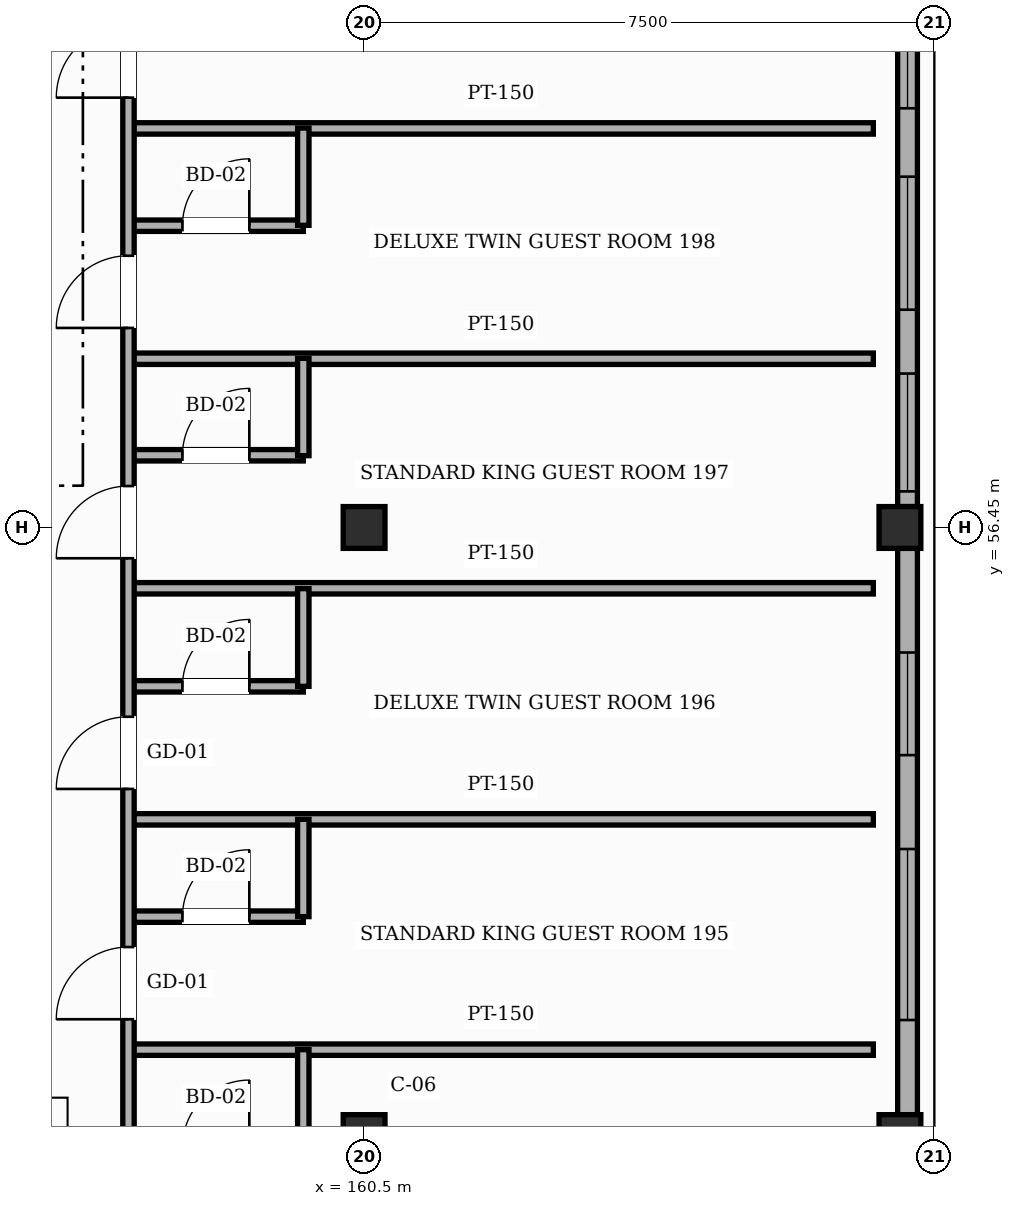
"""IFC4 building model, lengths in metres.
Left out: names, types, materials, properties, quantities, classifications, styles, units other than length and angle.
Written with IfcOpenShell. Run it as: python <this file> out.ifc"""

import sys

from ifc_helpers import new_model, si_unit, direction, frame, frame_2d, origin, origin_2d, place, context, subcontext, project, spatial, rectangle, hollow_rectangle, extrude, element, fill, save


model = new_model("IFC4")
c1 = context("Model", 3, precision=1e-05, world=origin(), true_north=direction((0.0, 1.0)))
c2 = subcontext(c1, "Body", "Model", "MODEL_VIEW")
j1 = project(units=[si_unit("LENGTHUNIT", "METRE"), si_unit("PLANEANGLEUNIT", "RADIAN")], contexts=[c1])
p1 = place(None, origin())
s1 = spatial("IfcSite", under=j1, at=p1, CompositionType="ELEMENT")
p2 = place(p1, origin())
s2 = spatial("IfcBuilding", under=s1, at=p2, CompositionType="ELEMENT")
p3 = place(p2, frame((0.0, 0.0, 31.8)))
s3 = spatial("IfcBuildingStorey", under=s2, at=p3, CompositionType="ELEMENT", Elevation=31.8)
for number, where, z_axis, x_axis in (
    (1, (160.5, 48.45, 0.0), (0.0, 0.0, 1.0), (1.0, 0.0, 0.0)),
    (2, (160.5, 56.45, 0.0), (0.0, 0.0, 1.0), (1.0, 0.0, 0.0)),
    (3, (167.55, 48.45, 0.0), (0.0, 0.0, 1.0), (1.0, 0.0, 0.0)),
    (4, (167.55, 56.45, 0.0), (0.0, 0.0, 1.0), (1.0, 0.0, 0.0)),
):
    element("IfcColumn", number, at=place(p3, frame(where, z_axis=z_axis, x_axis=x_axis)), inside=s3, PredefinedType="COLUMN", context=c2, shape_type="SweptSolid", body=[
        extrude(hollow_rectangle(XDim=0.55, YDim=0.55, WallThickness=0.022, InnerFilletRadius=0.022, OuterFilletRadius=0.044, at=origin_2d()), origin(), (0.0, 0.0, 1.0), 3.6),
    ])
p4 = place(p3, frame((167.65, 56.175, 0.0), z_axis=(0.0, 0.0, 1.0), x_axis=(0.0, -1.0, 0.0)))
e5 = element("IfcWall", 5, at=p4, inside=s3, PredefinedType="SOLIDWALL", context=c2, shape_type="SweptSolid", body=[
    extrude(rectangle(XDim=7.45, YDim=0.26, at=frame_2d((3.725, 0.0))), origin(), (0.0, 0.0, 1.0), 2.755),
])
p5 = place(p4, frame((3.955, 0.0, 0.85)))
e6 = element("IfcOpeningElement", 6, at=p5, cuts=e5, PredefinedType="OPENING", context=c2, shape_type="SweptSolid", body=[
    extrude(rectangle(XDim=2.25, YDim=1.65, at=frame_2d((1.125, 0.825))), frame((0.0, 0.14, 0.0), z_axis=(0.0, -1.0, 0.0), x_axis=(1.0, 0.0, 0.0)), (0.0, 0.0, 1.0), 0.28),
])
p6 = place(p4, frame((1.37, 0.0, 0.85)))
e7 = element("IfcOpeningElement", 7, at=p6, cuts=e5, PredefinedType="OPENING", context=c2, shape_type="SweptSolid", body=[
    extrude(rectangle(XDim=1.35, YDim=1.35, at=frame_2d((0.675, 0.675))), frame((0.0, 0.14, 0.0), z_axis=(0.0, -1.0, 0.0), x_axis=(1.0, 0.0, 0.0)), (0.0, 0.0, 1.0), 0.28),
])
p7 = place(p3, frame((167.65, 64.175, 0.0), z_axis=(0.0, 0.0, 1.0), x_axis=(0.0, -1.0, 0.0)))
e8 = element("IfcWall", 8, at=p7, inside=s3, PredefinedType="SOLIDWALL", context=c2, shape_type="SweptSolid", body=[
    extrude(rectangle(XDim=7.45, YDim=0.26, at=frame_2d((3.725, 0.0))), origin(), (0.0, 0.0, 1.0), 2.755),
])
p8 = place(p7, frame((5.7, 0.0, 0.85)))
e9 = element("IfcOpeningElement", 9, at=p8, cuts=e8, PredefinedType="OPENING", context=c2, shape_type="SweptSolid", body=[
    extrude(rectangle(XDim=1.55, YDim=1.35, at=frame_2d((0.775, 0.675))), frame((0.0, 0.14, 0.0), z_axis=(0.0, -1.0, 0.0), x_axis=(1.0, 0.0, 0.0)), (0.0, 0.0, 1.0), 0.28),
])
p9 = place(p7, frame((3.11, 0.0, 0.85)))
e10 = element("IfcOpeningElement", 10, at=p9, cuts=e8, PredefinedType="OPENING", context=c2, shape_type="SweptSolid", body=[
    extrude(rectangle(XDim=1.75, YDim=1.35, at=frame_2d((0.875, 0.675))), frame((0.0, 0.14, 0.0), z_axis=(0.0, -1.0, 0.0), x_axis=(1.0, 0.0, 0.0)), (0.0, 0.0, 1.0), 0.28),
])
p10 = place(p7, frame((0.26, 0.0, 0.85)))
e11 = element("IfcOpeningElement", 11, at=p10, cuts=e8, PredefinedType="OPENING", context=c2, shape_type="SweptSolid", body=[
    extrude(rectangle(XDim=1.95, YDim=1.35, at=frame_2d((0.975, 0.675))), frame((0.0, 0.14, 0.0), z_axis=(0.0, -1.0, 0.0), x_axis=(1.0, 0.0, 0.0)), (0.0, 0.0, 1.0), 0.28),
])
p11 = place(p3, frame((157.4, 49.58, 0.0), z_axis=(0.0, 0.0, 1.0), x_axis=(1.0, 0.0, 0.0)))
e12 = element("IfcWall", 12, at=p11, inside=s3, PredefinedType="PARTITIONING", context=c2, shape_type="SweptSolid", body=[
    extrude(rectangle(XDim=9.8, YDim=0.15, at=frame_2d((4.9, 0.0))), origin(), (0.0, 0.0, 1.0), 3.365),
])
p12 = place(p3, frame((157.4, 51.33, 0.0), z_axis=(0.0, 0.0, 1.0), x_axis=(1.0, 0.0, 0.0)))
e13 = element("IfcWall", 13, at=p12, inside=s3, PredefinedType="PARTITIONING", context=c2, shape_type="SweptSolid", body=[
    extrude(rectangle(XDim=2.3, YDim=0.15, at=frame_2d((1.15, 0.0))), origin(), (0.0, 0.0, 1.0), 3.365),
])
p13 = place(p12, frame((0.71, 0.0, 0.0)))
e14 = element("IfcOpeningElement", 14, at=p13, cuts=e13, PredefinedType="OPENING", context=c2, shape_type="SweptSolid", body=[
    extrude(rectangle(XDim=0.88, YDim=2.12, at=frame_2d((0.44, 1.06))), frame((0.0, 0.085, 0.0), z_axis=(0.0, -1.0, 0.0), x_axis=(1.0, 0.0, 0.0)), (0.0, 0.0, 1.0), 0.17),
])
p14 = place(p3, frame((157.4, 52.61, 0.0), z_axis=(0.0, 0.0, 1.0), x_axis=(1.0, 0.0, 0.0)))
e15 = element("IfcWall", 15, at=p14, inside=s3, PredefinedType="PARTITIONING", context=c2, shape_type="SweptSolid", body=[
    extrude(rectangle(XDim=9.8, YDim=0.15, at=frame_2d((4.9, 0.0))), origin(), (0.0, 0.0, 1.0), 3.055),
])
p15 = place(p3, frame((157.4, 54.36, 0.0), z_axis=(0.0, 0.0, 1.0), x_axis=(1.0, 0.0, 0.0)))
e16 = element("IfcWall", 16, at=p15, inside=s3, PredefinedType="PARTITIONING", context=c2, shape_type="SweptSolid", body=[
    extrude(rectangle(XDim=2.3, YDim=0.15, at=frame_2d((1.15, 0.0))), origin(), (0.0, 0.0, 1.0), 3.365),
])
p16 = place(p15, frame((0.71, 0.0, 0.0)))
e17 = element("IfcOpeningElement", 17, at=p16, cuts=e16, PredefinedType="OPENING", context=c2, shape_type="SweptSolid", body=[
    extrude(rectangle(XDim=0.88, YDim=2.12, at=frame_2d((0.44, 1.06))), frame((0.0, 0.085, 0.0), z_axis=(0.0, -1.0, 0.0), x_axis=(1.0, 0.0, 0.0)), (0.0, 0.0, 1.0), 0.17),
])
p17 = place(p3, frame((157.4, 55.65, 0.0), z_axis=(0.0, 0.0, 1.0), x_axis=(1.0, 0.0, 0.0)))
e18 = element("IfcWall", 18, at=p17, inside=s3, PredefinedType="PARTITIONING", context=c2, shape_type="SweptSolid", body=[
    extrude(rectangle(XDim=9.8, YDim=0.15, at=frame_2d((4.9, 0.0))), origin(), (0.0, 0.0, 1.0), 3.365),
])
p18 = place(p3, frame((157.4, 57.4, 0.0), z_axis=(0.0, 0.0, 1.0), x_axis=(1.0, 0.0, 0.0)))
e19 = element("IfcWall", 19, at=p18, inside=s3, PredefinedType="PARTITIONING", context=c2, shape_type="SweptSolid", body=[
    extrude(rectangle(XDim=2.3, YDim=0.15, at=frame_2d((1.15, 0.0))), origin(), (0.0, 0.0, 1.0), 3.365),
])
p19 = place(p18, frame((0.71, 0.0, 0.0)))
e20 = element("IfcOpeningElement", 20, at=p19, cuts=e19, PredefinedType="OPENING", context=c2, shape_type="SweptSolid", body=[
    extrude(rectangle(XDim=0.88, YDim=2.12, at=frame_2d((0.44, 1.06))), frame((0.0, 0.085, 0.0), z_axis=(0.0, -1.0, 0.0), x_axis=(1.0, 0.0, 0.0)), (0.0, 0.0, 1.0), 0.17),
])
p20 = place(p3, frame((157.4, 58.67, 0.0), z_axis=(0.0, 0.0, 1.0), x_axis=(1.0, 0.0, 0.0)))
e21 = element("IfcWall", 21, at=p20, inside=s3, PredefinedType="PARTITIONING", context=c2, shape_type="SweptSolid", body=[
    extrude(rectangle(XDim=9.8, YDim=0.15, at=frame_2d((4.9, 0.0))), origin(), (0.0, 0.0, 1.0), 3.365),
])
p21 = place(p3, frame((157.4, 60.42, 0.0), z_axis=(0.0, 0.0, 1.0), x_axis=(1.0, 0.0, 0.0)))
e22 = element("IfcWall", 22, at=p21, inside=s3, PredefinedType="PARTITIONING", context=c2, shape_type="SweptSolid", body=[
    extrude(rectangle(XDim=2.3, YDim=0.15, at=frame_2d((1.15, 0.0))), origin(), (0.0, 0.0, 1.0), 3.365),
])
p22 = place(p21, frame((0.71, 0.0, 0.0)))
e23 = element("IfcOpeningElement", 23, at=p22, cuts=e22, PredefinedType="OPENING", context=c2, shape_type="SweptSolid", body=[
    extrude(rectangle(XDim=0.88, YDim=2.12, at=frame_2d((0.44, 1.06))), frame((0.0, 0.085, 0.0), z_axis=(0.0, -1.0, 0.0), x_axis=(1.0, 0.0, 0.0)), (0.0, 0.0, 1.0), 0.17),
])
p23 = place(p3, frame((157.4, 61.7, 0.0), z_axis=(0.0, 0.0, 1.0), x_axis=(1.0, 0.0, 0.0)))
e24 = element("IfcWall", 24, at=p23, inside=s3, PredefinedType="PARTITIONING", context=c2, shape_type="SweptSolid", body=[
    extrude(rectangle(XDim=9.8, YDim=0.15, at=frame_2d((4.9, 0.0))), origin(), (0.0, 0.0, 1.0), 3.365),
])
p24 = place(p3, frame((157.4, 22.3, 0.0), z_axis=(0.0, 0.0, 1.0), x_axis=(0.0, 1.0, 0.0)))
e25 = element("IfcWall", 25, at=p24, inside=s3, PredefinedType="PARTITIONING", context=c2, shape_type="SweptSolid", body=[
    extrude(rectangle(XDim=48.5, YDim=0.15, at=frame_2d((24.25, 0.0))), origin(), (0.0, 0.0, 1.0), 3.365),
])
p25 = place(p24, frame((0.4, 0.0, 0.0)))
e26 = element("IfcOpeningElement", 26, at=p25, cuts=e25, PredefinedType="OPENING", context=c2, shape_type="SweptSolid", body=[
    extrude(rectangle(XDim=0.95, YDim=2.15, at=frame_2d((0.475, 1.075))), frame((0.0, 0.085, 0.0), z_axis=(0.0, -1.0, 0.0), x_axis=(1.0, 0.0, 0.0)), (0.0, 0.0, 1.0), 0.17),
])
p26 = place(p24, frame((3.43, 0.0, 0.0)))
e27 = element("IfcOpeningElement", 27, at=p26, cuts=e25, PredefinedType="OPENING", context=c2, shape_type="SweptSolid", body=[
    extrude(rectangle(XDim=0.95, YDim=2.15, at=frame_2d((0.475, 1.075))), frame((0.0, 0.085, 0.0), z_axis=(0.0, -1.0, 0.0), x_axis=(1.0, 0.0, 0.0)), (0.0, 0.0, 1.0), 0.17),
])
p27 = place(p24, frame((6.46, 0.0, 0.0)))
e28 = element("IfcOpeningElement", 28, at=p27, cuts=e25, PredefinedType="OPENING", context=c2, shape_type="SweptSolid", body=[
    extrude(rectangle(XDim=0.95, YDim=2.15, at=frame_2d((0.475, 1.075))), frame((0.0, 0.085, 0.0), z_axis=(0.0, -1.0, 0.0), x_axis=(1.0, 0.0, 0.0)), (0.0, 0.0, 1.0), 0.17),
])
p28 = place(p24, frame((9.495, 0.0, 0.0)))
e29 = element("IfcOpeningElement", 29, at=p28, cuts=e25, PredefinedType="OPENING", context=c2, shape_type="SweptSolid", body=[
    extrude(rectangle(XDim=0.95, YDim=2.15, at=frame_2d((0.475, 1.075))), frame((0.0, 0.085, 0.0), z_axis=(0.0, -1.0, 0.0), x_axis=(1.0, 0.0, 0.0)), (0.0, 0.0, 1.0), 0.17),
])
p29 = place(p24, frame((12.525, 0.0, 0.0)))
e30 = element("IfcOpeningElement", 30, at=p29, cuts=e25, PredefinedType="OPENING", context=c2, shape_type="SweptSolid", body=[
    extrude(rectangle(XDim=0.95, YDim=2.15, at=frame_2d((0.475, 1.075))), frame((0.0, 0.085, 0.0), z_axis=(0.0, -1.0, 0.0), x_axis=(1.0, 0.0, 0.0)), (0.0, 0.0, 1.0), 0.17),
])
p30 = place(p24, frame((15.555, 0.0, 0.0)))
e31 = element("IfcOpeningElement", 31, at=p30, cuts=e25, PredefinedType="OPENING", context=c2, shape_type="SweptSolid", body=[
    extrude(rectangle(XDim=0.95, YDim=2.15, at=frame_2d((0.475, 1.075))), frame((0.0, 0.085, 0.0), z_axis=(0.0, -1.0, 0.0), x_axis=(1.0, 0.0, 0.0)), (0.0, 0.0, 1.0), 0.17),
])
p31 = place(p24, frame((18.585, 0.0, 0.0)))
e32 = element("IfcOpeningElement", 32, at=p31, cuts=e25, PredefinedType="OPENING", context=c2, shape_type="SweptSolid", body=[
    extrude(rectangle(XDim=0.95, YDim=2.15, at=frame_2d((0.475, 1.075))), frame((0.0, 0.085, 0.0), z_axis=(0.0, -1.0, 0.0), x_axis=(1.0, 0.0, 0.0)), (0.0, 0.0, 1.0), 0.17),
])
p32 = place(p24, frame((21.62, 0.0, 0.0)))
e33 = element("IfcOpeningElement", 33, at=p32, cuts=e25, PredefinedType="OPENING", context=c2, shape_type="SweptSolid", body=[
    extrude(rectangle(XDim=0.95, YDim=2.15, at=frame_2d((0.475, 1.075))), frame((0.0, 0.085, 0.0), z_axis=(0.0, -1.0, 0.0), x_axis=(1.0, 0.0, 0.0)), (0.0, 0.0, 1.0), 0.17),
])
p33 = place(p24, frame((24.65, 0.0, 0.0)))
e34 = element("IfcOpeningElement", 34, at=p33, cuts=e25, PredefinedType="OPENING", context=c2, shape_type="SweptSolid", body=[
    extrude(rectangle(XDim=0.95, YDim=2.15, at=frame_2d((0.475, 1.075))), frame((0.0, 0.085, 0.0), z_axis=(0.0, -1.0, 0.0), x_axis=(1.0, 0.0, 0.0)), (0.0, 0.0, 1.0), 0.17),
])
p34 = place(p24, frame((27.68, 0.0, 0.0)))
e35 = element("IfcOpeningElement", 35, at=p34, cuts=e25, PredefinedType="OPENING", context=c2, shape_type="SweptSolid", body=[
    extrude(rectangle(XDim=0.95, YDim=2.15, at=frame_2d((0.475, 1.075))), frame((0.0, 0.085, 0.0), z_axis=(0.0, -1.0, 0.0), x_axis=(1.0, 0.0, 0.0)), (0.0, 0.0, 1.0), 0.17),
])
p35 = place(p24, frame((30.71, 0.0, 0.0)))
e36 = element("IfcOpeningElement", 36, at=p35, cuts=e25, PredefinedType="OPENING", context=c2, shape_type="SweptSolid", body=[
    extrude(rectangle(XDim=0.95, YDim=2.15, at=frame_2d((0.475, 1.075))), frame((0.0, 0.085, 0.0), z_axis=(0.0, -1.0, 0.0), x_axis=(1.0, 0.0, 0.0)), (0.0, 0.0, 1.0), 0.17),
])
p36 = place(p24, frame((33.745, 0.0, 0.0)))
e37 = element("IfcOpeningElement", 37, at=p36, cuts=e25, PredefinedType="OPENING", context=c2, shape_type="SweptSolid", body=[
    extrude(rectangle(XDim=0.95, YDim=2.15, at=frame_2d((0.475, 1.075))), frame((0.0, 0.085, 0.0), z_axis=(0.0, -1.0, 0.0), x_axis=(1.0, 0.0, 0.0)), (0.0, 0.0, 1.0), 0.17),
])
p37 = place(p24, frame((36.775, 0.0, 0.0)))
e38 = element("IfcOpeningElement", 38, at=p37, cuts=e25, PredefinedType="OPENING", context=c2, shape_type="SweptSolid", body=[
    extrude(rectangle(XDim=0.95, YDim=2.15, at=frame_2d((0.475, 1.075))), frame((0.0, 0.085, 0.0), z_axis=(0.0, -1.0, 0.0), x_axis=(1.0, 0.0, 0.0)), (0.0, 0.0, 1.0), 0.17),
])
p38 = place(p24, frame((39.805, 0.0, 0.0)))
e39 = element("IfcOpeningElement", 39, at=p38, cuts=e25, PredefinedType="OPENING", context=c2, shape_type="SweptSolid", body=[
    extrude(rectangle(XDim=0.95, YDim=2.15, at=frame_2d((0.475, 1.075))), frame((0.0, 0.085, 0.0), z_axis=(0.0, -1.0, 0.0), x_axis=(1.0, 0.0, 0.0)), (0.0, 0.0, 1.0), 0.17),
])
p39 = place(p24, frame((42.84, 0.0, 0.0)))
e40 = element("IfcOpeningElement", 40, at=p39, cuts=e25, PredefinedType="OPENING", context=c2, shape_type="SweptSolid", body=[
    extrude(rectangle(XDim=0.95, YDim=2.15, at=frame_2d((0.475, 1.075))), frame((0.0, 0.085, 0.0), z_axis=(0.0, -1.0, 0.0), x_axis=(1.0, 0.0, 0.0)), (0.0, 0.0, 1.0), 0.17),
])
p40 = place(p24, frame((45.87, 0.0, 0.0)))
e41 = element("IfcOpeningElement", 41, at=p40, cuts=e25, PredefinedType="OPENING", context=c2, shape_type="SweptSolid", body=[
    extrude(rectangle(XDim=0.95, YDim=2.15, at=frame_2d((0.475, 1.075))), frame((0.0, 0.085, 0.0), z_axis=(0.0, -1.0, 0.0), x_axis=(1.0, 0.0, 0.0)), (0.0, 0.0, 1.0), 0.17),
])
for number, where, z_axis, x_axis in (
    (42, (159.7, 48.3, 0.0), (0.0, 0.0, 1.0), (0.0, 1.0, 0.0)),
    (43, (159.7, 51.33, 0.0), (0.0, 0.0, 1.0), (0.0, 1.0, 0.0)),
):
    element("IfcWall", number, at=place(p3, frame(where, z_axis=z_axis, x_axis=x_axis)), inside=s3, PredefinedType="PARTITIONING", context=c2, shape_type="SweptSolid", body=[
        extrude(rectangle(XDim=1.28, YDim=0.15, at=frame_2d((0.64, 0.0))), origin(), (0.0, 0.0, 1.0), 3.365),
    ])
p41 = place(p3, frame((159.7, 54.36, 0.0), z_axis=(0.0, 0.0, 1.0), x_axis=(0.0, 1.0, 0.0)))
e44 = element("IfcWall", 44, at=p41, inside=s3, PredefinedType="PARTITIONING", context=c2, shape_type="SweptSolid", body=[
    extrude(rectangle(XDim=1.285, YDim=0.15, at=frame_2d((0.643, 0.0))), origin(), (0.0, 0.0, 1.0), 3.365),
])
for number, where, z_axis, x_axis in (
    (45, (159.7, 57.395, 0.0), (0.0, 0.0, 1.0), (0.0, 1.0, 0.0)),
    (46, (159.7, 60.425, 0.0), (0.0, 0.0, 1.0), (0.0, 1.0, 0.0)),
):
    element("IfcWall", number, at=place(p3, frame(where, z_axis=z_axis, x_axis=x_axis)), inside=s3, PredefinedType="PARTITIONING", context=c2, shape_type="SweptSolid", body=[
        extrude(rectangle(XDim=1.28, YDim=0.15, at=frame_2d((0.64, 0.0))), origin(), (0.0, 0.0, 1.0), 3.365),
    ])
p42 = place(p5, origin())
e47 = element("IfcWindow", 47, at=p42, inside=s3, PartitioningType="SINGLE_PANEL", PredefinedType="WINDOW", context=c2, shape_type="SweptSolid", body=[
    extrude(rectangle(XDim=2.25, YDim=1.65, at=frame_2d((1.125, 0.825))), frame((0.0, 0.03, 0.0), z_axis=(0.0, -1.0, 0.0), x_axis=(1.0, 0.0, 0.0)), (0.0, 0.0, 1.0), 0.06),
])
fill(e6, e47)
p43 = place(p6, origin())
e48 = element("IfcWindow", 48, at=p43, inside=s3, PartitioningType="SINGLE_PANEL", PredefinedType="WINDOW", context=c2, shape_type="SweptSolid", body=[
    extrude(rectangle(XDim=1.35, YDim=1.35, at=frame_2d((0.675, 0.675))), frame((0.0, 0.03, 0.0), z_axis=(0.0, -1.0, 0.0), x_axis=(1.0, 0.0, 0.0)), (0.0, 0.0, 1.0), 0.06),
])
fill(e7, e48)
p44 = place(p8, origin())
e49 = element("IfcWindow", 49, at=p44, inside=s3, PartitioningType="SINGLE_PANEL", PredefinedType="WINDOW", context=c2, shape_type="SweptSolid", body=[
    extrude(rectangle(XDim=1.55, YDim=1.35, at=frame_2d((0.775, 0.675))), frame((0.0, 0.03, 0.0), z_axis=(0.0, -1.0, 0.0), x_axis=(1.0, 0.0, 0.0)), (0.0, 0.0, 1.0), 0.06),
])
fill(e9, e49)
p45 = place(p9, origin())
e50 = element("IfcWindow", 50, at=p45, inside=s3, PartitioningType="SINGLE_PANEL", PredefinedType="WINDOW", context=c2, shape_type="SweptSolid", body=[
    extrude(rectangle(XDim=1.75, YDim=1.35, at=frame_2d((0.875, 0.675))), frame((0.0, 0.03, 0.0), z_axis=(0.0, -1.0, 0.0), x_axis=(1.0, 0.0, 0.0)), (0.0, 0.0, 1.0), 0.06),
])
fill(e10, e50)
p46 = place(p10, origin())
e51 = element("IfcWindow", 51, at=p46, inside=s3, PartitioningType="SINGLE_PANEL", PredefinedType="WINDOW", context=c2, shape_type="SweptSolid", body=[
    extrude(rectangle(XDim=1.95, YDim=1.35, at=frame_2d((0.975, 0.675))), frame((0.0, 0.03, 0.0), z_axis=(0.0, -1.0, 0.0), x_axis=(1.0, 0.0, 0.0)), (0.0, 0.0, 1.0), 0.06),
])
fill(e11, e51)
p47 = place(p34, origin())
e52 = element("IfcDoor", 52, at=p47, inside=s3, OperationType="SINGLE_SWING_LEFT", PredefinedType="DOOR", context=c2, shape_type="SweptSolid", body=[
    extrude(rectangle(XDim=0.95, YDim=2.15, at=frame_2d((0.475, 1.075))), frame((0.0, 0.025, 0.0), z_axis=(0.0, -1.0, 0.0), x_axis=(1.0, 0.0, 0.0)), (0.0, 0.0, 1.0), 0.05),
])
fill(e35, e52)
p48 = place(p13, origin())
e53 = element("IfcDoor", 53, at=p48, inside=s3, OperationType="SINGLE_SWING_RIGHT", PredefinedType="DOOR", context=c2, shape_type="SweptSolid", body=[
    extrude(rectangle(XDim=0.88, YDim=2.12, at=frame_2d((0.44, 1.06))), frame((0.0, 0.025, 0.0), z_axis=(0.0, -1.0, 0.0), x_axis=(1.0, 0.0, 0.0)), (0.0, 0.0, 1.0), 0.05),
])
fill(e14, e53)
p49 = place(p35, origin())
e54 = element("IfcDoor", 54, at=p49, inside=s3, OperationType="SINGLE_SWING_LEFT", PredefinedType="DOOR", context=c2, shape_type="SweptSolid", body=[
    extrude(rectangle(XDim=0.95, YDim=2.15, at=frame_2d((0.475, 1.075))), frame((0.0, 0.025, 0.0), z_axis=(0.0, -1.0, 0.0), x_axis=(1.0, 0.0, 0.0)), (0.0, 0.0, 1.0), 0.05),
])
fill(e36, e54)
p50 = place(p16, origin())
e55 = element("IfcDoor", 55, at=p50, inside=s3, OperationType="SINGLE_SWING_RIGHT", PredefinedType="DOOR", context=c2, shape_type="SweptSolid", body=[
    extrude(rectangle(XDim=0.88, YDim=2.12, at=frame_2d((0.44, 1.06))), frame((0.0, 0.025, 0.0), z_axis=(0.0, -1.0, 0.0), x_axis=(1.0, 0.0, 0.0)), (0.0, 0.0, 1.0), 0.05),
])
fill(e17, e55)
p51 = place(p36, origin())
e56 = element("IfcDoor", 56, at=p51, inside=s3, OperationType="SINGLE_SWING_LEFT", PredefinedType="DOOR", context=c2, shape_type="SweptSolid", body=[
    extrude(rectangle(XDim=0.95, YDim=2.15, at=frame_2d((0.475, 1.075))), frame((0.0, 0.025, 0.0), z_axis=(0.0, -1.0, 0.0), x_axis=(1.0, 0.0, 0.0)), (0.0, 0.0, 1.0), 0.05),
])
fill(e37, e56)
p52 = place(p19, origin())
e57 = element("IfcDoor", 57, at=p52, inside=s3, OperationType="SINGLE_SWING_RIGHT", PredefinedType="DOOR", context=c2, shape_type="SweptSolid", body=[
    extrude(rectangle(XDim=0.88, YDim=2.12, at=frame_2d((0.44, 1.06))), frame((0.0, 0.025, 0.0), z_axis=(0.0, -1.0, 0.0), x_axis=(1.0, 0.0, 0.0)), (0.0, 0.0, 1.0), 0.05),
])
fill(e20, e57)
p53 = place(p37, origin())
e58 = element("IfcDoor", 58, at=p53, inside=s3, OperationType="SINGLE_SWING_LEFT", PredefinedType="DOOR", context=c2, shape_type="SweptSolid", body=[
    extrude(rectangle(XDim=0.95, YDim=2.15, at=frame_2d((0.475, 1.075))), frame((0.0, 0.025, 0.0), z_axis=(0.0, -1.0, 0.0), x_axis=(1.0, 0.0, 0.0)), (0.0, 0.0, 1.0), 0.05),
])
fill(e38, e58)
p54 = place(p22, origin())
e59 = element("IfcDoor", 59, at=p54, inside=s3, OperationType="SINGLE_SWING_RIGHT", PredefinedType="DOOR", context=c2, shape_type="SweptSolid", body=[
    extrude(rectangle(XDim=0.88, YDim=2.12, at=frame_2d((0.44, 1.06))), frame((0.0, 0.025, 0.0), z_axis=(0.0, -1.0, 0.0), x_axis=(1.0, 0.0, 0.0)), (0.0, 0.0, 1.0), 0.05),
])
fill(e23, e59)
p55 = place(p38, origin())
e60 = element("IfcDoor", 60, at=p55, inside=s3, OperationType="SINGLE_SWING_LEFT", PredefinedType="DOOR", context=c2, shape_type="SweptSolid", body=[
    extrude(rectangle(XDim=0.95, YDim=2.15, at=frame_2d((0.475, 1.075))), frame((0.0, 0.025, 0.0), z_axis=(0.0, -1.0, 0.0), x_axis=(1.0, 0.0, 0.0)), (0.0, 0.0, 1.0), 0.05),
])
fill(e39, e60)
save(model, sys.argv[1])
